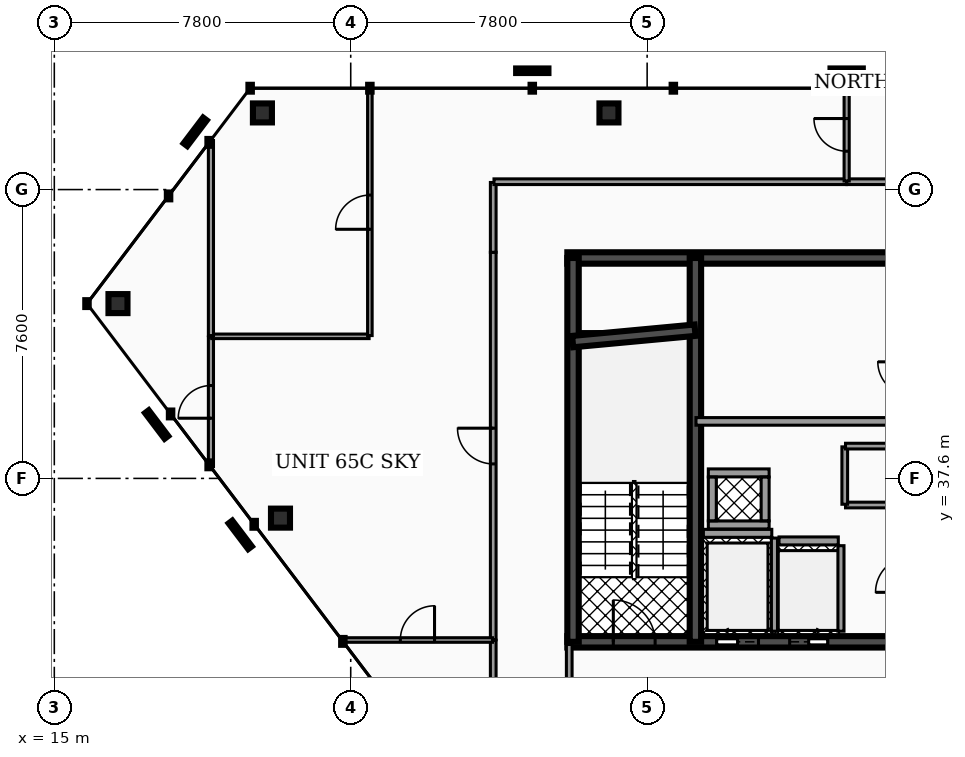
"""IFC4 building model, lengths in metres.
Left out: names, types, materials, properties, quantities, classifications, styles, units other than length and angle.
Written with IfcOpenShell. Run it as: python <this file> out.ifc"""

import sys

from ifc_helpers import new_model, si_unit, direction, frame, frame_2d, origin, origin_2d, place, context, subcontext, project, spatial, rectangle, hollow_rectangle, extrude, element, fill, save


model = new_model("IFC4")
c1 = context("Model", 3, precision=1e-05, world=origin(), true_north=direction((0.0, 1.0)))
c2 = subcontext(c1, "Body", "Model", "MODEL_VIEW")
j1 = project(units=[si_unit("LENGTHUNIT", "METRE"), si_unit("PLANEANGLEUNIT", "RADIAN")], contexts=[c1])
p1 = place(None, origin())
s1 = spatial("IfcSite", under=j1, at=p1, CompositionType="ELEMENT")
p2 = place(p1, origin())
s2 = spatial("IfcBuilding", under=s1, at=p2, CompositionType="ELEMENT")
p3 = place(p2, frame((0.0, 0.0, 258.4)))
s3 = spatial("IfcBuildingStorey", under=s2, at=p3, CompositionType="ELEMENT", Elevation=258.4)
p4 = place(p3, frame((28.5, 43.4, 0.0), z_axis=(0.0, 0.0, 1.0), x_axis=(1.0, 0.0, 0.0)))
e1 = element("IfcWall", 1, at=p4, inside=s3, PredefinedType="SHEAR", context=c2, shape_type="SweptSolid", body=[
    extrude(rectangle(XDim=19.86, YDim=0.3, at=frame_2d((9.93, 0.0))), origin(), (0.0, 0.0, 1.0), 3.18),
])
p5 = place(p3, frame((28.5, 33.3, 0.0), z_axis=(0.0, 0.0, 1.0), x_axis=(1.0, 0.0, 0.0)))
e2 = element("IfcWall", 2, at=p5, inside=s3, PredefinedType="SHEAR", context=c2, shape_type="SweptSolid", body=[
    extrude(rectangle(XDim=19.86, YDim=0.3, at=frame_2d((9.93, 0.0))), origin(), (0.0, 0.0, 1.0), 3.18),
])
p6 = place(p5, frame((3.93, 0.0, 0.0)))
e3 = element("IfcOpeningElement", 3, at=p6, cuts=e2, PredefinedType="OPENING", context=c2, shape_type="SweptSolid", body=[
    extrude(rectangle(XDim=1.1, YDim=2.15, at=frame_2d((0.55, 1.075))), frame((0.0, 0.16, 0.0), z_axis=(0.0, -1.0, 0.0), x_axis=(1.0, 0.0, 0.0)), (0.0, 0.0, 1.0), 0.32),
])
p7 = place(p5, frame((14.77, 0.0, 0.0)))
e4 = element("IfcOpeningElement", 4, at=p7, cuts=e2, PredefinedType="OPENING", context=c2, shape_type="SweptSolid", body=[
    extrude(rectangle(XDim=1.1, YDim=2.15, at=frame_2d((0.55, 1.075))), frame((0.0, 0.16, 0.0), z_axis=(0.0, -1.0, 0.0), x_axis=(1.0, 0.0, 0.0)), (0.0, 0.0, 1.0), 0.32),
])
p8 = place(p5, frame((11.25, 0.0, 0.0)))
e5 = element("IfcOpeningElement", 5, at=p8, cuts=e2, PredefinedType="OPENING", context=c2, shape_type="SweptSolid", body=[
    extrude(rectangle(XDim=1.0, YDim=2.1, at=frame_2d((0.5, 1.05))), frame((0.0, 0.16, 0.0), z_axis=(0.0, -1.0, 0.0), x_axis=(1.0, 0.0, 0.0)), (0.0, 0.0, 1.0), 0.32),
])
p9 = place(p5, frame((12.95, 0.0, 0.0)))
e6 = element("IfcOpeningElement", 6, at=p9, cuts=e2, PredefinedType="OPENING", context=c2, shape_type="SweptSolid", body=[
    extrude(rectangle(XDim=1.0, YDim=2.1, at=frame_2d((0.5, 1.05))), frame((0.0, 0.16, 0.0), z_axis=(0.0, -1.0, 0.0), x_axis=(1.0, 0.0, 0.0)), (0.0, 0.0, 1.0), 0.32),
])
p10 = place(p5, frame((5.85, 0.0, 0.0)))
e7 = element("IfcOpeningElement", 7, at=p10, cuts=e2, PredefinedType="OPENING", context=c2, shape_type="SweptSolid", body=[
    extrude(rectangle(XDim=1.0, YDim=2.1, at=frame_2d((0.5, 1.05))), frame((0.0, 0.16, 0.0), z_axis=(0.0, -1.0, 0.0), x_axis=(1.0, 0.0, 0.0)), (0.0, 0.0, 1.0), 0.32),
])
p11 = place(p5, frame((1.21, 0.0, 0.0)))
e8 = element("IfcOpeningElement", 8, at=p11, cuts=e2, PredefinedType="OPENING", context=c2, shape_type="SweptSolid", body=[
    extrude(rectangle(XDim=1.1, YDim=2.2, at=frame_2d((0.55, 1.1))), frame((0.0, 0.16, 0.0), z_axis=(0.0, -1.0, 0.0), x_axis=(1.0, 0.0, 0.0)), (0.0, 0.0, 1.0), 0.32),
])
p12 = place(p5, frame((9.34, 0.0, 0.0)))
e9 = element("IfcOpeningElement", 9, at=p12, cuts=e2, PredefinedType="OPENING", context=c2, shape_type="SweptSolid", body=[
    extrude(rectangle(XDim=1.12, YDim=2.05, at=frame_2d((0.56, 1.025))), frame((0.0, 0.16, 0.0), z_axis=(0.0, -1.0, 0.0), x_axis=(1.0, 0.0, 0.0)), (0.0, 0.0, 1.0), 0.32),
])
p13 = place(p5, frame((17.55, 0.0, 0.0)))
e10 = element("IfcOpeningElement", 10, at=p13, cuts=e2, PredefinedType="OPENING", context=c2, shape_type="SweptSolid", body=[
    extrude(rectangle(XDim=1.1, YDim=2.2, at=frame_2d((0.55, 1.1))), frame((0.0, 0.16, 0.0), z_axis=(0.0, -1.0, 0.0), x_axis=(1.0, 0.0, 0.0)), (0.0, 0.0, 1.0), 0.32),
])
for number, where, z_axis, x_axis in (
    (11, (28.65, 33.3, 0.0), (0.0, 0.0, 1.0), (0.0, 1.0, 0.0)),
    (12, (31.87, 33.3, 0.0), (0.0, 0.0, 1.0), (0.0, 1.0, 0.0)),
):
    element("IfcWall", number, at=place(p3, frame(where, z_axis=z_axis, x_axis=x_axis)), inside=s3, PredefinedType="SHEAR", context=c2, shape_type="SweptSolid", body=[
        extrude(rectangle(XDim=10.1, YDim=0.3, at=frame_2d((5.05, 0.0))), origin(), (0.0, 0.0, 1.0), 3.18),
    ])
p14 = place(p3, frame((28.64, 41.2, 0.0), z_axis=(0.0, 0.0, 1.0), x_axis=(0.995687118776, 0.092774789157, 0.0)))
e13 = element("IfcWall", 13, at=p14, inside=s3, PredefinedType="SHEAR", context=c2, shape_type="SweptSolid", body=[
    extrude(rectangle(XDim=3.234, YDim=0.3, at=frame_2d((1.617, 0.0))), origin(), (0.0, 0.0, 1.0), 3.18),
])
for number, where, z_axis, x_axis in (
    (14, (29.595, 47.217, 0.0), (0.0, 0.0, 1.0), (1.0, 0.0, 0.0)),
    (15, (20.476, 47.217, 0.0), (0.0, 0.0, 1.0), (1.0, 0.0, 0.0)),
    (16, (16.676, 42.199, 0.0), (0.0, 0.0, 1.0), (1.0, 0.0, 0.0)),
    (17, (20.952, 36.555, 0.0), (0.0, 0.0, 1.0), (1.0, 0.0, 0.0)),
):
    element("IfcColumn", number, at=place(p3, frame(where, z_axis=z_axis, x_axis=x_axis)), inside=s3, PredefinedType="COLUMN", context=c2, shape_type="SweptSolid", body=[
        extrude(hollow_rectangle(XDim=0.5, YDim=0.5, WallThickness=0.025, at=origin_2d()), origin(), (0.0, 0.0, 1.0), 3.18),
    ])
p15 = place(p3, frame((32.08, 36.155, 0.0), z_axis=(0.0, 0.0, 1.0), x_axis=(1.0, 0.0, 0.0)))
e18 = element("IfcWall", 18, at=p15, inside=s3, PredefinedType="SOLIDWALL", context=c2, shape_type="SweptSolid", body=[
    extrude(rectangle(XDim=1.8, YDim=0.21, at=frame_2d((0.9, 0.0))), origin(), (0.0, 0.0, 1.0), 3.18),
])
p16 = place(p3, frame((33.95, 33.58, 0.0), z_axis=(0.0, 0.0, 1.0), x_axis=(0.0, 1.0, 0.0)))
e19 = element("IfcWall", 19, at=p16, inside=s3, PredefinedType="SOLIDWALL", context=c2, shape_type="SweptSolid", body=[
    extrude(rectangle(XDim=2.45, YDim=0.16, at=frame_2d((1.225, 0.0))), origin(), (0.0, 0.0, 1.0), 3.18),
])
p17 = place(p3, frame((34.07, 35.955, 0.0), z_axis=(0.0, 0.0, 1.0), x_axis=(1.0, 0.0, 0.0)))
e20 = element("IfcWall", 20, at=p17, inside=s3, PredefinedType="SOLIDWALL", context=c2, shape_type="SweptSolid", body=[
    extrude(rectangle(XDim=1.56, YDim=0.21, at=frame_2d((0.78, 0.0))), origin(), (0.0, 0.0, 1.0), 3.18),
])
p18 = place(p3, frame((35.7, 33.58, 0.0), z_axis=(0.0, 0.0, 1.0), x_axis=(0.0, 1.0, 0.0)))
e21 = element("IfcWall", 21, at=p18, inside=s3, PredefinedType="SOLIDWALL", context=c2, shape_type="SweptSolid", body=[
    extrude(rectangle(XDim=2.25, YDim=0.16, at=frame_2d((1.125, 0.0))), origin(), (0.0, 0.0, 1.0), 3.18),
])
for number, where, z_axis, x_axis in (
    (22, (32.21, 36.375, 0.0), (0.0, 0.0, 1.0), (1.0, 0.0, 0.0)),
    (23, (32.21, 37.745, 0.0), (0.0, 0.0, 1.0), (1.0, 0.0, 0.0)),
):
    element("IfcWall", number, at=place(p3, frame(where, z_axis=z_axis, x_axis=x_axis)), inside=s3, PredefinedType="SOLIDWALL", context=c2, shape_type="SweptSolid", body=[
        extrude(rectangle(XDim=1.6, YDim=0.21, at=frame_2d((0.8, 0.0))), origin(), (0.0, 0.0, 1.0), 3.18),
    ])
for number, where, z_axis, x_axis in (
    (24, (32.315, 36.485, 0.0), (0.0, 0.0, 1.0), (0.0, 1.0, 0.0)),
    (25, (33.705, 36.485, 0.0), (0.0, 0.0, 1.0), (0.0, 1.0, 0.0)),
):
    element("IfcWall", number, at=place(p3, frame(where, z_axis=z_axis, x_axis=x_axis)), inside=s3, PredefinedType="SOLIDWALL", context=c2, shape_type="SweptSolid", body=[
        extrude(rectangle(XDim=1.15, YDim=0.21, at=frame_2d((0.575, 0.0))), origin(), (0.0, 0.0, 1.0), 3.18),
    ])
p19 = place(p3, frame((35.82, 36.9, 0.0), z_axis=(0.0, 0.0, 1.0), x_axis=(1.0, 0.0, 0.0)))
e26 = element("IfcWall", 26, at=p19, inside=s3, PredefinedType="PARTITIONING", context=c2, shape_type="SweptSolid", body=[
    extrude(rectangle(XDim=1.71, YDim=0.15, at=frame_2d((0.855, 0.0))), origin(), (0.0, 0.0, 1.0), 2.235),
])
p20 = place(p3, frame((35.8, 36.92, 0.0), z_axis=(0.0, 0.0, 1.0), x_axis=(0.0, 1.0, 0.0)))
e27 = element("IfcWall", 27, at=p20, inside=s3, PredefinedType="PARTITIONING", context=c2, shape_type="SweptSolid", body=[
    extrude(rectangle(XDim=1.51, YDim=0.15, at=frame_2d((0.755, 0.0))), origin(), (0.0, 0.0, 1.0), 2.235),
])
p21 = place(p3, frame((35.82, 38.45, 0.0), z_axis=(0.0, 0.0, 1.0), x_axis=(1.0, 0.0, 0.0)))
e28 = element("IfcWall", 28, at=p21, inside=s3, PredefinedType="PARTITIONING", context=c2, shape_type="SweptSolid", body=[
    extrude(rectangle(XDim=1.71, YDim=0.15, at=frame_2d((0.855, 0.0))), origin(), (0.0, 0.0, 1.0), 2.235),
])
p22 = place(p3, frame((31.885, 39.1, 0.0), z_axis=(0.0, 0.0, 1.0), x_axis=(1.0, 0.0, 0.0)))
e29 = element("IfcWall", 29, at=p22, inside=s3, PredefinedType="PARTITIONING", context=c2, shape_type="SweptSolid", body=[
    extrude(rectangle(XDim=5.645, YDim=0.2, at=frame_2d((2.823, 0.0))), origin(), (0.0, 0.0, 1.0), 2.235),
])
p23 = place(p3, frame((28.55, 30.17, 0.0), z_axis=(0.0, 0.0, 1.0), x_axis=(0.0, 1.0, 0.0)))
e30 = element("IfcWall", 30, at=p23, inside=s3, PredefinedType="PARTITIONING", context=c2, shape_type="SweptSolid", body=[
    extrude(rectangle(XDim=3.06, YDim=0.15, at=frame_2d((1.53, 0.0))), origin(), (0.0, 0.0, 1.0), 2.235),
])
p24 = place(p23, frame((1.06, 0.0, 0.0)))
e31 = element("IfcOpeningElement", 31, at=p24, cuts=e30, PredefinedType="OPENING", context=c2, shape_type="SweptSolid", body=[
    extrude(rectangle(XDim=0.94, YDim=2.05, at=frame_2d((0.47, 1.025))), frame((0.0, 0.085, 0.0), z_axis=(0.0, -1.0, 0.0), x_axis=(1.0, 0.0, 0.0)), (0.0, 0.0, 1.0), 0.17),
])
p25 = place(p3, frame((26.55, 33.353, 0.0), z_axis=(0.0, 0.0, 1.0), x_axis=(0.0, 1.0, 0.0)))
e32 = element("IfcWall", 32, at=p25, inside=s3, PredefinedType="PARTITIONING", context=c2, shape_type="SweptSolid", body=[
    extrude(rectangle(XDim=10.197, YDim=0.15, at=frame_2d((5.099, 0.0))), origin(), (0.0, 0.0, 1.0), 2.235),
])
p26 = place(p25, frame((4.628, 0.0, 0.0)))
e33 = element("IfcOpeningElement", 33, at=p26, cuts=e32, PredefinedType="OPENING", context=c2, shape_type="SweptSolid", body=[
    extrude(rectangle(XDim=0.94, YDim=2.05, at=frame_2d((0.47, 1.025))), frame((0.0, 0.085, 0.0), z_axis=(0.0, -1.0, 0.0), x_axis=(1.0, 0.0, 0.0)), (0.0, 0.0, 1.0), 0.17),
])
p27 = place(p3, frame((26.55, 43.55, 0.0), z_axis=(0.0, 0.0, 1.0), x_axis=(0.0, 1.0, 0.0)))
e34 = element("IfcWall", 34, at=p27, inside=s3, PredefinedType="PARTITIONING", context=c2, shape_type="SweptSolid", body=[
    extrude(rectangle(XDim=1.837, YDim=0.15, at=frame_2d((0.918, 0.0))), origin(), (0.0, 0.0, 1.0), 2.235),
])
p28 = place(p3, frame((26.57, 45.407, 0.0), z_axis=(0.0, 0.0, 1.0), x_axis=(1.0, 0.0, 0.0)))
e35 = element("IfcWall", 35, at=p28, inside=s3, PredefinedType="PARTITIONING", context=c2, shape_type="SweptSolid", body=[
    extrude(rectangle(XDim=9.275, YDim=0.15, at=frame_2d((4.637, 0.0))), origin(), (0.0, 0.0, 1.0), 2.235),
])
p29 = place(p3, frame((35.855, 45.407, 0.0), z_axis=(0.0, 0.0, 1.0), x_axis=(1.0, 0.0, 0.0)))
e36 = element("IfcWall", 36, at=p29, inside=s3, PredefinedType="PARTITIONING", context=c2, shape_type="SweptSolid", body=[
    extrude(rectangle(XDim=2.54, YDim=0.15, at=frame_2d((1.27, 0.0))), origin(), (0.0, 0.0, 1.0), 2.235),
])
p30 = place(p3, frame((26.55, 32.183, 0.0), z_axis=(0.0, 0.0, 1.0), x_axis=(0.0, 1.0, 0.0)))
e37 = element("IfcWall", 37, at=p30, inside=s3, PredefinedType="PARTITIONING", context=c2, shape_type="SweptSolid", body=[
    extrude(rectangle(XDim=1.16, YDim=0.15, at=frame_2d((0.58, 0.0))), origin(), (0.0, 0.0, 1.0), 2.235),
])
p31 = place(p3, frame((19.122, 37.909, 0.0), z_axis=(0.0, 0.0, 1.0), x_axis=(0.0, 1.0, 0.0)))
e38 = element("IfcWall", 38, at=p31, inside=s3, PredefinedType="PARTITIONING", context=c2, shape_type="SweptSolid", body=[
    extrude(rectangle(XDim=3.409, YDim=0.135, at=frame_2d((1.705, 0.0))), origin(), (0.0, 0.0, 1.0), 2.235),
])
p32 = place(p31, frame((1.275, 0.0, 0.0)))
e39 = element("IfcOpeningElement", 39, at=p32, cuts=e38, PredefinedType="OPENING", context=c2, shape_type="SweptSolid", body=[
    extrude(rectangle(XDim=0.86, YDim=2.05, at=frame_2d((0.43, 1.025))), frame((0.0, 0.077, 0.0), z_axis=(0.0, -1.0, 0.0), x_axis=(1.0, 0.0, 0.0)), (0.0, 0.0, 1.0), 0.155),
])
p33 = place(p3, frame((35.85, 45.427, 0.0), z_axis=(0.0, 0.0, 1.0), x_axis=(0.0, 1.0, 0.0)))
e40 = element("IfcWall", 40, at=p33, inside=s3, PredefinedType="PARTITIONING", context=c2, shape_type="SweptSolid", body=[
    extrude(rectangle(XDim=2.425, YDim=0.135, at=frame_2d((1.212, 0.0))), origin(), (0.0, 0.0, 1.0), 2.235),
])
p34 = place(p33, frame((0.782, 0.0, 0.0)))
e41 = element("IfcOpeningElement", 41, at=p34, cuts=e40, PredefinedType="OPENING", context=c2, shape_type="SweptSolid", body=[
    extrude(rectangle(XDim=0.86, YDim=2.05, at=frame_2d((0.43, 1.025))), frame((0.0, 0.077, 0.0), z_axis=(0.0, -1.0, 0.0), x_axis=(1.0, 0.0, 0.0)), (0.0, 0.0, 1.0), 0.155),
])
p35 = place(p3, frame((19.142, 41.338, 0.0), z_axis=(0.0, 0.0, 1.0), x_axis=(1.0, 0.0, 0.0)))
e42 = element("IfcWall", 42, at=p35, inside=s3, PredefinedType="PARTITIONING", context=c2, shape_type="SweptSolid", body=[
    extrude(rectangle(XDim=4.142, YDim=0.12, at=frame_2d((2.071, 0.0))), origin(), (0.0, 0.0, 1.0), 2.235),
])
p36 = place(p3, frame((23.304, 41.358, 0.0), z_axis=(0.0, 0.0, 1.0), x_axis=(0.0, 1.0, 0.0)))
e43 = element("IfcWall", 43, at=p36, inside=s3, PredefinedType="PARTITIONING", context=c2, shape_type="SweptSolid", body=[
    extrude(rectangle(XDim=6.493, YDim=0.12, at=frame_2d((3.247, 0.0))), origin(), (0.0, 0.0, 1.0), 2.235),
])
p37 = place(p36, frame((2.797, 0.0, 0.0)))
e44 = element("IfcOpeningElement", 44, at=p37, cuts=e43, PredefinedType="OPENING", context=c2, shape_type="SweptSolid", body=[
    extrude(rectangle(XDim=0.9, YDim=2.05, at=frame_2d((0.45, 1.025))), frame((0.0, 0.07, 0.0), z_axis=(0.0, -1.0, 0.0), x_axis=(1.0, 0.0, 0.0)), (0.0, 0.0, 1.0), 0.14),
])
p38 = place(p3, frame((22.581, 33.348, 0.0), z_axis=(0.0, 0.0, 1.0), x_axis=(1.0, 0.0, 0.0)))
e45 = element("IfcWall", 45, at=p38, inside=s3, PredefinedType="PARTITIONING", context=c2, shape_type="SweptSolid", body=[
    extrude(rectangle(XDim=3.949, YDim=0.12, at=frame_2d((1.975, 0.0))), origin(), (0.0, 0.0, 1.0), 2.235),
])
p39 = place(p38, frame((1.525, 0.0, 0.0)))
e46 = element("IfcOpeningElement", 46, at=p39, cuts=e45, PredefinedType="OPENING", context=c2, shape_type="SweptSolid", body=[
    extrude(rectangle(XDim=0.9, YDim=2.05, at=frame_2d((0.45, 1.025))), frame((0.0, 0.07, 0.0), z_axis=(0.0, -1.0, 0.0), x_axis=(1.0, 0.0, 0.0)), (0.0, 0.0, 1.0), 0.14),
])
p40 = place(p3, frame((19.122, 41.358, 0.0), z_axis=(0.0, 0.0, 1.0), x_axis=(0.0, 1.0, 0.0)))
e47 = element("IfcWall", 47, at=p40, inside=s3, PredefinedType="PARTITIONING", context=c2, shape_type="SweptSolid", body=[
    extrude(rectangle(XDim=5.131, YDim=0.135, at=frame_2d((2.566, 0.0))), origin(), (0.0, 0.0, 1.0), 2.235),
])
p41 = place(p6, origin())
e48 = element("IfcDoor", 48, at=p41, inside=s3, OperationType="SLIDING_TO_LEFT", PredefinedType="DOOR", context=c2, shape_type="SweptSolid", body=[
    extrude(rectangle(XDim=1.1, YDim=2.15, at=frame_2d((0.55, 1.075))), frame((0.0, 0.025, 0.0), z_axis=(0.0, -1.0, 0.0), x_axis=(1.0, 0.0, 0.0)), (0.0, 0.0, 1.0), 0.05),
])
fill(e3, e48)
p42 = place(p10, origin())
e49 = element("IfcDoor", 49, at=p42, inside=s3, OperationType="SLIDING_TO_RIGHT", PredefinedType="DOOR", context=c2, shape_type="SweptSolid", body=[
    extrude(rectangle(XDim=1.0, YDim=2.1, at=frame_2d((0.5, 1.05))), frame((0.0, 0.025, 0.0), z_axis=(0.0, -1.0, 0.0), x_axis=(1.0, 0.0, 0.0)), (0.0, 0.0, 1.0), 0.05),
])
fill(e7, e49)
p43 = place(p11, origin())
e50 = element("IfcDoor", 50, at=p43, inside=s3, OperationType="SINGLE_SWING_LEFT", PredefinedType="DOOR", context=c2, shape_type="SweptSolid", body=[
    extrude(rectangle(XDim=1.1, YDim=2.2, at=frame_2d((0.55, 1.1))), frame((0.0, 0.025, 0.0), z_axis=(0.0, -1.0, 0.0), x_axis=(1.0, 0.0, 0.0)), (0.0, 0.0, 1.0), 0.05),
])
fill(e8, e50)
p44 = place(p26, origin())
e51 = element("IfcDoor", 51, at=p44, inside=s3, OperationType="SINGLE_SWING_RIGHT", PredefinedType="DOOR", context=c2, shape_type="SweptSolid", body=[
    extrude(rectangle(XDim=0.94, YDim=2.05, at=frame_2d((0.47, 1.025))), frame((0.0, 0.025, 0.0), z_axis=(0.0, -1.0, 0.0), x_axis=(1.0, 0.0, 0.0)), (0.0, 0.0, 1.0), 0.05),
])
fill(e33, e51)
p45 = place(p32, origin())
e52 = element("IfcDoor", 52, at=p45, inside=s3, OperationType="SINGLE_SWING_LEFT", PredefinedType="DOOR", context=c2, shape_type="SweptSolid", body=[
    extrude(rectangle(XDim=0.86, YDim=2.05, at=frame_2d((0.43, 1.025))), frame((0.0, 0.025, 0.0), z_axis=(0.0, -1.0, 0.0), x_axis=(1.0, 0.0, 0.0)), (0.0, 0.0, 1.0), 0.05),
])
fill(e39, e52)
p46 = place(p34, origin())
e53 = element("IfcDoor", 53, at=p46, inside=s3, OperationType="SINGLE_SWING_RIGHT", PredefinedType="DOOR", context=c2, shape_type="SweptSolid", body=[
    extrude(rectangle(XDim=0.86, YDim=2.05, at=frame_2d((0.43, 1.025))), frame((0.0, 0.025, 0.0), z_axis=(0.0, -1.0, 0.0), x_axis=(1.0, 0.0, 0.0)), (0.0, 0.0, 1.0), 0.05),
])
fill(e41, e53)
p47 = place(p37, origin())
e54 = element("IfcDoor", 54, at=p47, inside=s3, OperationType="SINGLE_SWING_LEFT", PredefinedType="DOOR", context=c2, shape_type="SweptSolid", body=[
    extrude(rectangle(XDim=0.9, YDim=2.05, at=frame_2d((0.45, 1.025))), frame((0.0, 0.025, 0.0), z_axis=(0.0, -1.0, 0.0), x_axis=(1.0, 0.0, 0.0)), (0.0, 0.0, 1.0), 0.05),
])
fill(e44, e54)
p48 = place(p39, origin())
e55 = element("IfcDoor", 55, at=p48, inside=s3, OperationType="SINGLE_SWING_RIGHT", PredefinedType="DOOR", context=c2, shape_type="SweptSolid", body=[
    extrude(rectangle(XDim=0.9, YDim=2.05, at=frame_2d((0.45, 1.025))), frame((0.0, 0.025, 0.0), z_axis=(0.0, -1.0, 0.0), x_axis=(1.0, 0.0, 0.0)), (0.0, 0.0, 1.0), 0.05),
])
fill(e46, e55)
save(model, sys.argv[1])
